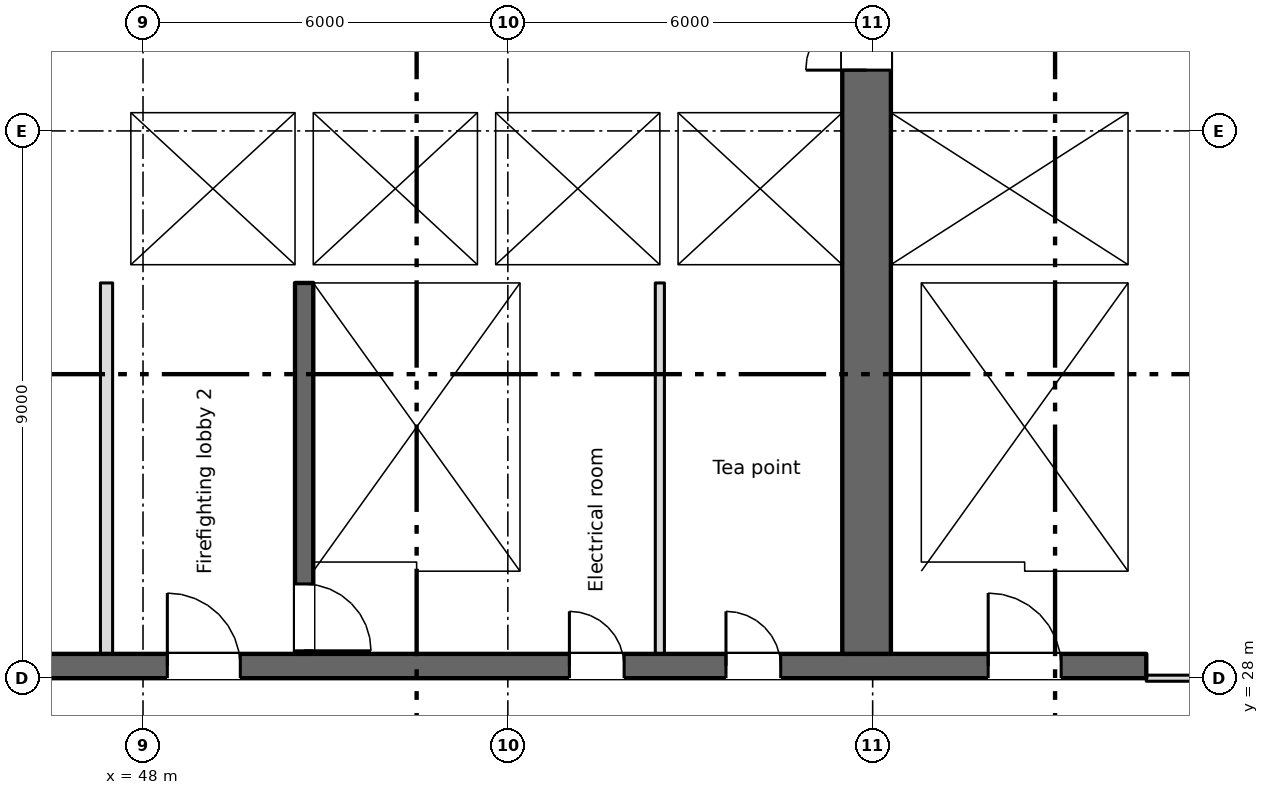
"""IFC4 building model, lengths in metres.
Left out: names, types, materials, properties, quantities, classifications, styles, units other than length and angle.
Written with IfcOpenShell. Run it as: python <this file> out.ifc"""

import sys

from ifc_helpers import new_model, si_unit, direction, frame, frame_2d, origin, place, context, subcontext, project, spatial, rectangle, extrude, element, fill, save


model = new_model("IFC4")
c1 = context("Model", 3, precision=1e-05, world=origin(), true_north=direction((0.0, 1.0)))
c2 = subcontext(c1, "Body", "Model", "MODEL_VIEW")
j1 = project(units=[si_unit("LENGTHUNIT", "METRE"), si_unit("PLANEANGLEUNIT", "RADIAN")], contexts=[c1])
p1 = place(None, origin())
s1 = spatial("IfcSite", under=j1, at=p1, CompositionType="ELEMENT")
p2 = place(p1, origin())
s2 = spatial("IfcBuilding", under=s1, at=p2, CompositionType="ELEMENT")
p3 = place(p2, frame((0.0, 0.0, 95.0)))
s3 = spatial("IfcBuildingStorey", under=s2, at=p3, CompositionType="ELEMENT", Elevation=95.0)
p4 = place(p3, frame((6.7, 28.2, 0.0), z_axis=(0.0, 0.0, 1.0), x_axis=(1.0, 0.0, 0.0)))
e1 = element("IfcWall", 1, at=p4, inside=s3, PredefinedType="SHEAR", context=c2, shape_type="SweptSolid", body=[
    extrude(rectangle(XDim=57.8, YDim=0.4, at=frame_2d((28.9, 0.0))), origin(), (0.0, 0.0, 1.0), 3.35),
])
p5 = place(p4, frame((12.812, 0.0, 0.0)))
e2 = element("IfcOpeningElement", 2, at=p5, cuts=e1, PredefinedType="OPENING", context=c2, shape_type="SweptSolid", body=[
    extrude(rectangle(XDim=0.9, YDim=2.1, at=frame_2d((0.45, 1.05))), frame((0.0, 0.21, 0.0), z_axis=(0.0, -1.0, 0.0), x_axis=(1.0, 0.0, 0.0)), (0.0, 0.0, 1.0), 0.42),
])
p6 = place(p4, frame((15.387, 0.0, 0.0)))
e3 = element("IfcOpeningElement", 3, at=p6, cuts=e1, PredefinedType="OPENING", context=c2, shape_type="SweptSolid", body=[
    extrude(rectangle(XDim=0.9, YDim=2.1, at=frame_2d((0.45, 1.05))), frame((0.0, 0.21, 0.0), z_axis=(0.0, -1.0, 0.0), x_axis=(1.0, 0.0, 0.0)), (0.0, 0.0, 1.0), 0.42),
])
p7 = place(p4, frame((48.312, 0.0, 0.0)))
e4 = element("IfcOpeningElement", 4, at=p7, cuts=e1, PredefinedType="OPENING", context=c2, shape_type="SweptSolid", body=[
    extrude(rectangle(XDim=0.9, YDim=2.1, at=frame_2d((0.45, 1.05))), frame((0.0, 0.21, 0.0), z_axis=(0.0, -1.0, 0.0), x_axis=(1.0, 0.0, 0.0)), (0.0, 0.0, 1.0), 0.42),
])
p8 = place(p4, frame((50.887, 0.0, 0.0)))
e5 = element("IfcOpeningElement", 5, at=p8, cuts=e1, PredefinedType="OPENING", context=c2, shape_type="SweptSolid", body=[
    extrude(rectangle(XDim=0.9, YDim=2.1, at=frame_2d((0.45, 1.05))), frame((0.0, 0.21, 0.0), z_axis=(0.0, -1.0, 0.0), x_axis=(1.0, 0.0, 0.0)), (0.0, 0.0, 1.0), 0.42),
])
p9 = place(p4, frame((0.562, 0.0, 0.0)))
e6 = element("IfcOpeningElement", 6, at=p9, cuts=e1, PredefinedType="OPENING", context=c2, shape_type="SweptSolid", body=[
    extrude(rectangle(XDim=0.9, YDim=2.1, at=frame_2d((0.45, 1.05))), frame((0.0, 0.21, 0.0), z_axis=(0.0, -1.0, 0.0), x_axis=(1.0, 0.0, 0.0)), (0.0, 0.0, 1.0), 0.42),
])
p10 = place(p4, frame((2.137, 0.0, 0.0)))
e7 = element("IfcOpeningElement", 7, at=p10, cuts=e1, PredefinedType="OPENING", context=c2, shape_type="SweptSolid", body=[
    extrude(rectangle(XDim=0.9, YDim=2.1, at=frame_2d((0.45, 1.05))), frame((0.0, 0.21, 0.0), z_axis=(0.0, -1.0, 0.0), x_axis=(1.0, 0.0, 0.0)), (0.0, 0.0, 1.0), 0.42),
])
p11 = place(p4, frame((4.7, 0.0, 0.0)))
e8 = element("IfcOpeningElement", 8, at=p11, cuts=e1, PredefinedType="OPENING", context=c2, shape_type="SweptSolid", body=[
    extrude(rectangle(XDim=1.2, YDim=2.1, at=frame_2d((0.6, 1.05))), frame((0.0, 0.21, 0.0), z_axis=(0.0, -1.0, 0.0), x_axis=(1.0, 0.0, 0.0)), (0.0, 0.0, 1.0), 0.42),
])
p12 = place(p4, frame((31.7, 0.0, 0.0)))
e9 = element("IfcOpeningElement", 9, at=p12, cuts=e1, PredefinedType="OPENING", context=c2, shape_type="SweptSolid", body=[
    extrude(rectangle(XDim=1.2, YDim=2.1, at=frame_2d((0.6, 1.05))), frame((0.0, 0.21, 0.0), z_axis=(0.0, -1.0, 0.0), x_axis=(1.0, 0.0, 0.0)), (0.0, 0.0, 1.0), 0.42),
])
p13 = place(p4, frame((55.2, 0.0, 0.0)))
e10 = element("IfcOpeningElement", 10, at=p13, cuts=e1, PredefinedType="OPENING", context=c2, shape_type="SweptSolid", body=[
    extrude(rectangle(XDim=1.2, YDim=2.1, at=frame_2d((0.6, 1.05))), frame((0.0, 0.21, 0.0), z_axis=(0.0, -1.0, 0.0), x_axis=(1.0, 0.0, 0.0)), (0.0, 0.0, 1.0), 0.42),
])
p14 = place(p4, frame((21.7, 0.0, 0.0)))
e11 = element("IfcOpeningElement", 11, at=p14, cuts=e1, PredefinedType="OPENING", context=c2, shape_type="SweptSolid", body=[
    extrude(rectangle(XDim=1.2, YDim=2.1, at=frame_2d((0.6, 1.05))), frame((0.0, 0.21, 0.0), z_axis=(0.0, -1.0, 0.0), x_axis=(1.0, 0.0, 0.0)), (0.0, 0.0, 1.0), 0.42),
])
p15 = place(p4, frame((41.7, 0.0, 0.0)))
e12 = element("IfcOpeningElement", 12, at=p15, cuts=e1, PredefinedType="OPENING", context=c2, shape_type="SweptSolid", body=[
    extrude(rectangle(XDim=1.2, YDim=2.1, at=frame_2d((0.6, 1.05))), frame((0.0, 0.21, 0.0), z_axis=(0.0, -1.0, 0.0), x_axis=(1.0, 0.0, 0.0)), (0.0, 0.0, 1.0), 0.42),
])
p16 = place(p4, frame((24.85, 0.0, 0.0)))
e13 = element("IfcOpeningElement", 13, at=p16, cuts=e1, PredefinedType="OPENING", context=c2, shape_type="SweptSolid", body=[
    extrude(rectangle(XDim=2.4, YDim=2.1, at=frame_2d((1.2, 1.05))), frame((0.0, 0.21, 0.0), z_axis=(0.0, -1.0, 0.0), x_axis=(1.0, 0.0, 0.0)), (0.0, 0.0, 1.0), 0.42),
])
p17 = place(p4, frame((37.35, 0.0, 0.0)))
e14 = element("IfcOpeningElement", 14, at=p17, cuts=e1, PredefinedType="OPENING", context=c2, shape_type="SweptSolid", body=[
    extrude(rectangle(XDim=2.4, YDim=2.1, at=frame_2d((1.2, 1.05))), frame((0.0, 0.21, 0.0), z_axis=(0.0, -1.0, 0.0), x_axis=(1.0, 0.0, 0.0)), (0.0, 0.0, 1.0), 0.42),
])
p18 = place(p4, frame((7.95, 0.0, 0.0)))
e15 = element("IfcOpeningElement", 15, at=p18, cuts=e1, PredefinedType="OPENING", context=c2, shape_type="SweptSolid", body=[
    extrude(rectangle(XDim=2.4, YDim=2.1, at=frame_2d((1.2, 1.05))), frame((0.0, 0.21, 0.0), z_axis=(0.0, -1.0, 0.0), x_axis=(1.0, 0.0, 0.0)), (0.0, 0.0, 1.0), 0.42),
])
p19 = place(p4, frame((28.85, 0.0, 0.0)))
e16 = element("IfcOpeningElement", 16, at=p19, cuts=e1, PredefinedType="OPENING", context=c2, shape_type="SweptSolid", body=[
    extrude(rectangle(XDim=0.9, YDim=2.1, at=frame_2d((0.45, 1.05))), frame((0.0, 0.21, 0.0), z_axis=(0.0, -1.0, 0.0), x_axis=(1.0, 0.0, 0.0)), (0.0, 0.0, 1.0), 0.42),
])
p20 = place(p4, frame((34.85, 0.0, 0.0)))
e17 = element("IfcOpeningElement", 17, at=p20, cuts=e1, PredefinedType="OPENING", context=c2, shape_type="SweptSolid", body=[
    extrude(rectangle(XDim=0.9, YDim=2.1, at=frame_2d((0.45, 1.05))), frame((0.0, 0.21, 0.0), z_axis=(0.0, -1.0, 0.0), x_axis=(1.0, 0.0, 0.0)), (0.0, 0.0, 1.0), 0.42),
])
p21 = place(p3, frame((64.35, 34.8, 0.0), z_axis=(0.0, 0.0, 1.0), x_axis=(0.0, 1.0, 0.0)))
e18 = element("IfcWall", 18, at=p21, inside=s3, PredefinedType="SHEAR", context=c2, shape_type="SweptSolid", body=[
    extrude(rectangle(XDim=10.4, YDim=0.3, at=frame_2d((5.2, 0.0))), origin(), (0.0, 0.0, 1.0), 3.35),
])
p22 = place(p3, frame((59.9, 28.4, 0.0), z_axis=(0.0, 0.0, 1.0), x_axis=(0.0, 1.0, 0.0)))
e19 = element("IfcWall", 19, at=p22, inside=s3, PredefinedType="SHEAR", context=c2, shape_type="SweptSolid", body=[
    extrude(rectangle(XDim=16.8, YDim=0.8, at=frame_2d((8.4, 0.0))), origin(), (0.0, 0.0, 1.0), 3.35),
])
p23 = place(p22, frame((9.6, 0.0, 0.0)))
e20 = element("IfcOpeningElement", 20, at=p23, cuts=e19, PredefinedType="OPENING", context=c2, shape_type="SweptSolid", body=[
    extrude(rectangle(XDim=2.0, YDim=2.1, at=frame_2d((1.0, 1.05))), frame((0.0, 0.41, 0.0), z_axis=(0.0, -1.0, 0.0), x_axis=(1.0, 0.0, 0.0)), (0.0, 0.0, 1.0), 0.82),
])
p24 = place(p22, frame((15.35, 0.0, 0.0)))
e21 = element("IfcOpeningElement", 21, at=p24, cuts=e19, PredefinedType="OPENING", context=c2, shape_type="SweptSolid", body=[
    extrude(rectangle(XDim=1.2, YDim=2.1, at=frame_2d((0.6, 1.05))), frame((0.0, 0.41, 0.0), z_axis=(0.0, -1.0, 0.0), x_axis=(1.0, 0.0, 0.0)), (0.0, 0.0, 1.0), 0.82),
])
p25 = place(p3, frame((50.65, 34.5, 0.0), z_axis=(0.0, 0.0, 1.0), x_axis=(0.0, -1.0, 0.0)))
e22 = element("IfcWall", 22, at=p25, inside=s3, PredefinedType="SHEAR", context=c2, shape_type="SweptSolid", body=[
    extrude(rectangle(XDim=6.1, YDim=0.3, at=frame_2d((3.05, 0.0))), origin(), (0.0, 0.0, 1.0), 3.35),
])
p26 = place(p25, frame((4.95, 0.0, 0.0)))
e23 = element("IfcOpeningElement", 23, at=p26, cuts=e22, PredefinedType="OPENING", context=c2, shape_type="SweptSolid", body=[
    extrude(rectangle(XDim=1.1, YDim=2.1, at=frame_2d((0.55, 1.05))), frame((0.0, 0.16, 0.0), z_axis=(0.0, -1.0, 0.0), x_axis=(1.0, 0.0, 0.0)), (0.0, 0.0, 1.0), 0.32),
])
p27 = place(p3, frame((54.35, 28.4, 0.0), z_axis=(0.0, 0.0, 1.0), x_axis=(0.0, 1.0, 0.0)))
e24 = element("IfcWall", 24, at=p27, inside=s3, PredefinedType="SHEAR", context=c2, shape_type="SweptSolid", body=[
    extrude(rectangle(XDim=6.1, YDim=0.3, at=frame_2d((3.05, 0.0))), origin(), (0.0, 0.0, 1.0), 3.35),
])
p28 = place(p3, frame((60.55, 28.4, 0.0), z_axis=(0.0, 0.0, 1.0), x_axis=(0.0, 1.0, 0.0)))
e25 = element("IfcWall", 25, at=p28, inside=s3, PredefinedType="SHEAR", context=c2, shape_type="SweptSolid", body=[
    extrude(rectangle(XDim=6.1, YDim=0.5, at=frame_2d((3.05, 0.0))), origin(), (0.0, 0.0, 1.0), 3.35),
])
p29 = place(p3, frame((64.35, 28.4, 0.0), z_axis=(0.0, 0.0, 1.0), x_axis=(0.0, 1.0, 0.0)))
e26 = element("IfcWall", 26, at=p29, inside=s3, PredefinedType="SHEAR", context=c2, shape_type="SweptSolid", body=[
    extrude(rectangle(XDim=6.1, YDim=0.3, at=frame_2d((3.05, 0.0))), origin(), (0.0, 0.0, 1.0), 3.35),
])
p30 = place(p3, frame((47.3, 34.65, 0.0), z_axis=(0.0, 0.0, 1.0), x_axis=(1.0, 0.0, 0.0)))
e27 = element("IfcWall", 27, at=p30, inside=s3, PredefinedType="SHEAR", context=c2, shape_type="SweptSolid", body=[
    extrude(rectangle(XDim=12.2, YDim=0.3, at=frame_2d((6.1, 0.0))), origin(), (0.0, 0.0, 1.0), 3.35),
])
p31 = place(p30, frame((1.3, 0.0, 0.0)))
e28 = element("IfcOpeningElement", 28, at=p31, cuts=e27, PredefinedType="OPENING", context=c2, shape_type="SweptSolid", body=[
    extrude(rectangle(XDim=1.1, YDim=2.1, at=frame_2d((0.55, 1.05))), frame((0.0, 0.16, 0.0), z_axis=(0.0, -1.0, 0.0), x_axis=(1.0, 0.0, 0.0)), (0.0, 0.0, 1.0), 0.32),
])
p32 = place(p3, frame((60.3, 34.65, 0.0), z_axis=(0.0, 0.0, 1.0), x_axis=(1.0, 0.0, 0.0)))
e29 = element("IfcWall", 29, at=p32, inside=s3, PredefinedType="SHEAR", context=c2, shape_type="SweptSolid", body=[
    extrude(rectangle(XDim=4.2, YDim=0.3, at=frame_2d((2.1, 0.0))), origin(), (0.0, 0.0, 1.0), 3.35),
])
p33 = place(p3, frame((47.3, 37.45, 0.0), z_axis=(0.0, 0.0, 1.0), x_axis=(1.0, 0.0, 0.0)))
e30 = element("IfcWall", 30, at=p33, inside=s3, PredefinedType="SHEAR", context=c2, shape_type="SweptSolid", body=[
    extrude(rectangle(XDim=12.2, YDim=0.3, at=frame_2d((6.1, 0.0))), origin(), (0.0, 0.0, 1.0), 3.35),
])
p34 = place(p33, frame((4.3, 0.0, 0.0)))
e31 = element("IfcOpeningElement", 31, at=p34, cuts=e30, PredefinedType="OPENING", context=c2, shape_type="SweptSolid", body=[
    extrude(rectangle(XDim=1.1, YDim=2.1, at=frame_2d((0.55, 1.05))), frame((0.0, 0.16, 0.0), z_axis=(0.0, -1.0, 0.0), x_axis=(1.0, 0.0, 0.0)), (0.0, 0.0, 1.0), 0.32),
])
p35 = place(p33, frame((7.3, 0.0, 0.0)))
e32 = element("IfcOpeningElement", 32, at=p35, cuts=e30, PredefinedType="OPENING", context=c2, shape_type="SweptSolid", body=[
    extrude(rectangle(XDim=1.1, YDim=2.1, at=frame_2d((0.55, 1.05))), frame((0.0, 0.16, 0.0), z_axis=(0.0, -1.0, 0.0), x_axis=(1.0, 0.0, 0.0)), (0.0, 0.0, 1.0), 0.32),
])
p36 = place(p33, frame((10.3, 0.0, 0.0)))
e33 = element("IfcOpeningElement", 33, at=p36, cuts=e30, PredefinedType="OPENING", context=c2, shape_type="SweptSolid", body=[
    extrude(rectangle(XDim=1.1, YDim=2.1, at=frame_2d((0.55, 1.05))), frame((0.0, 0.16, 0.0), z_axis=(0.0, -1.0, 0.0), x_axis=(1.0, 0.0, 0.0)), (0.0, 0.0, 1.0), 0.32),
])
p37 = place(p3, frame((60.3, 37.45, 0.0), z_axis=(0.0, 0.0, 1.0), x_axis=(1.0, 0.0, 0.0)))
e34 = element("IfcWall", 34, at=p37, inside=s3, PredefinedType="SHEAR", context=c2, shape_type="SweptSolid", body=[
    extrude(rectangle(XDim=3.9, YDim=0.3, at=frame_2d((1.95, 0.0))), origin(), (0.0, 0.0, 1.0), 3.35),
])
p38 = place(p37, frame((1.4, 0.0, 0.0)))
e35 = element("IfcOpeningElement", 35, at=p38, cuts=e34, PredefinedType="OPENING", context=c2, shape_type="SweptSolid", body=[
    extrude(rectangle(XDim=1.1, YDim=2.1, at=frame_2d((0.55, 1.05))), frame((0.0, 0.16, 0.0), z_axis=(0.0, -1.0, 0.0), x_axis=(1.0, 0.0, 0.0)), (0.0, 0.0, 1.0), 0.32),
])
p39 = place(p3, frame((47.55, 34.8, 0.0), z_axis=(0.0, 0.0, 1.0), x_axis=(0.0, 1.0, 0.0)))
e36 = element("IfcWall", 36, at=p39, inside=s3, PredefinedType="SHEAR", context=c2, shape_type="SweptSolid", body=[
    extrude(rectangle(XDim=2.5, YDim=0.5, at=frame_2d((1.25, 0.0))), origin(), (0.0, 0.0, 1.0), 3.35),
])
for number, where, z_axis, x_axis in (
    (37, (50.65, 34.8, 0.0), (0.0, 0.0, 1.0), (0.0, 1.0, 0.0)),
    (38, (53.65, 34.8, 0.0), (0.0, 0.0, 1.0), (0.0, 1.0, 0.0)),
    (39, (56.65, 34.8, 0.0), (0.0, 0.0, 1.0), (0.0, 1.0, 0.0)),
):
    element("IfcWall", number, at=place(p3, frame(where, z_axis=z_axis, x_axis=x_axis)), inside=s3, PredefinedType="SHEAR", context=c2, shape_type="SweptSolid", body=[
        extrude(rectangle(XDim=2.5, YDim=0.3, at=frame_2d((1.25, 0.0))), origin(), (0.0, 0.0, 1.0), 3.35),
    ])
p40 = place(p3, frame((47.4, 28.4, 0.0), z_axis=(0.0, 0.0, 1.0), x_axis=(0.0, 1.0, 0.0)))
e40 = element("IfcWall", 40, at=p40, inside=s3, PredefinedType="PARTITIONING", context=c2, shape_type="SweptSolid", body=[
    extrude(rectangle(XDim=6.1, YDim=0.2, at=frame_2d((3.05, 0.0))), origin(), (0.0, 0.0, 1.0), 3.35),
])
p41 = place(p3, frame((56.5, 28.4, 0.0), z_axis=(0.0, 0.0, 1.0), x_axis=(0.0, 1.0, 0.0)))
e41 = element("IfcWall", 41, at=p41, inside=s3, PredefinedType="PARTITIONING", context=c2, shape_type="SweptSolid", body=[
    extrude(rectangle(XDim=6.1, YDim=0.15, at=frame_2d((3.05, 0.0))), origin(), (0.0, 0.0, 1.0), 3.35),
])
p42 = place(p3, frame((64.5, 28.0, 0.0), z_axis=(0.0, 0.0, 1.0), x_axis=(1.0, 0.0, 0.0)))
e42 = element("IfcWall", 42, at=p42, inside=s3, PredefinedType="PARTITIONING", context=c2, shape_type="SweptSolid", body=[
    extrude(rectangle(XDim=6.8, YDim=0.1, at=frame_2d((3.4, 0.0))), origin(), (0.0, 0.0, 1.0), 3.35),
])
p43 = place(p42, frame((2.5, 0.0, 0.0)))
e43 = element("IfcOpeningElement", 43, at=p43, cuts=e42, PredefinedType="OPENING", context=c2, shape_type="SweptSolid", body=[
    extrude(rectangle(XDim=1.8, YDim=2.1, at=frame_2d((0.9, 1.05))), frame((0.0, 0.06, 0.0), z_axis=(0.0, -1.0, 0.0), x_axis=(1.0, 0.0, 0.0)), (0.0, 0.0, 1.0), 0.12),
])
p44 = place(p7, origin())
e44 = element("IfcDoor", 44, at=p44, inside=s3, OperationType="SINGLE_SWING_LEFT", PredefinedType="DOOR", context=c2, shape_type="SweptSolid", body=[
    extrude(rectangle(XDim=0.9, YDim=2.1, at=frame_2d((0.45, 1.05))), frame((0.0, 0.025, 0.0), z_axis=(0.0, -1.0, 0.0), x_axis=(1.0, 0.0, 0.0)), (0.0, 0.0, 1.0), 0.05),
])
fill(e4, e44)
p45 = place(p8, origin())
e45 = element("IfcDoor", 45, at=p45, inside=s3, OperationType="SINGLE_SWING_LEFT", PredefinedType="DOOR", context=c2, shape_type="SweptSolid", body=[
    extrude(rectangle(XDim=0.9, YDim=2.1, at=frame_2d((0.45, 1.05))), frame((0.0, 0.025, 0.0), z_axis=(0.0, -1.0, 0.0), x_axis=(1.0, 0.0, 0.0)), (0.0, 0.0, 1.0), 0.05),
])
fill(e5, e45)
p46 = place(p34, origin())
e46 = element("IfcDoor", 46, at=p46, inside=s3, OperationType="SLIDING_TO_LEFT", PredefinedType="DOOR", context=c2, shape_type="SweptSolid", body=[
    extrude(rectangle(XDim=1.1, YDim=2.1, at=frame_2d((0.55, 1.05))), frame((0.0, 0.025, 0.0), z_axis=(0.0, -1.0, 0.0), x_axis=(1.0, 0.0, 0.0)), (0.0, 0.0, 1.0), 0.05),
])
fill(e31, e46)
p47 = place(p35, origin())
e47 = element("IfcDoor", 47, at=p47, inside=s3, OperationType="SLIDING_TO_LEFT", PredefinedType="DOOR", context=c2, shape_type="SweptSolid", body=[
    extrude(rectangle(XDim=1.1, YDim=2.1, at=frame_2d((0.55, 1.05))), frame((0.0, 0.025, 0.0), z_axis=(0.0, -1.0, 0.0), x_axis=(1.0, 0.0, 0.0)), (0.0, 0.0, 1.0), 0.05),
])
fill(e32, e47)
p48 = place(p36, origin())
e48 = element("IfcDoor", 48, at=p48, inside=s3, OperationType="SLIDING_TO_LEFT", PredefinedType="DOOR", context=c2, shape_type="SweptSolid", body=[
    extrude(rectangle(XDim=1.1, YDim=2.1, at=frame_2d((0.55, 1.05))), frame((0.0, 0.025, 0.0), z_axis=(0.0, -1.0, 0.0), x_axis=(1.0, 0.0, 0.0)), (0.0, 0.0, 1.0), 0.05),
])
fill(e33, e48)
p49 = place(p38, origin())
e49 = element("IfcDoor", 49, at=p49, inside=s3, OperationType="SLIDING_TO_LEFT", PredefinedType="DOOR", context=c2, shape_type="SweptSolid", body=[
    extrude(rectangle(XDim=1.1, YDim=2.1, at=frame_2d((0.55, 1.05))), frame((0.0, 0.025, 0.0), z_axis=(0.0, -1.0, 0.0), x_axis=(1.0, 0.0, 0.0)), (0.0, 0.0, 1.0), 0.05),
])
fill(e35, e49)
p50 = place(p31, origin())
e50 = element("IfcDoor", 50, at=p50, inside=s3, OperationType="SLIDING_TO_LEFT", PredefinedType="DOOR", context=c2, shape_type="SweptSolid", body=[
    extrude(rectangle(XDim=1.1, YDim=2.1, at=frame_2d((0.55, 1.05))), frame((0.0, 0.025, 0.0), z_axis=(0.0, -1.0, 0.0), x_axis=(1.0, 0.0, 0.0)), (0.0, 0.0, 1.0), 0.05),
])
fill(e28, e50)
p51 = place(p26, origin())
e51 = element("IfcDoor", 51, at=p51, inside=s3, OperationType="SINGLE_SWING_RIGHT", PredefinedType="DOOR", context=c2, shape_type="SweptSolid", body=[
    extrude(rectangle(XDim=1.1, YDim=2.1, at=frame_2d((0.55, 1.05))), frame((0.0, 0.025, 0.0), z_axis=(0.0, -1.0, 0.0), x_axis=(1.0, 0.0, 0.0)), (0.0, 0.0, 1.0), 0.05),
])
fill(e23, e51)
p52 = place(p13, origin())
e52 = element("IfcDoor", 52, at=p52, inside=s3, OperationType="SINGLE_SWING_LEFT", PredefinedType="DOOR", context=c2, shape_type="SweptSolid", body=[
    extrude(rectangle(XDim=1.2, YDim=2.1, at=frame_2d((0.6, 1.05))), frame((0.0, 0.025, 0.0), z_axis=(0.0, -1.0, 0.0), x_axis=(1.0, 0.0, 0.0)), (0.0, 0.0, 1.0), 0.05),
])
fill(e10, e52)
p53 = place(p15, origin())
e53 = element("IfcDoor", 53, at=p53, inside=s3, OperationType="SINGLE_SWING_LEFT", PredefinedType="DOOR", context=c2, shape_type="SweptSolid", body=[
    extrude(rectangle(XDim=1.2, YDim=2.1, at=frame_2d((0.6, 1.05))), frame((0.0, 0.025, 0.0), z_axis=(0.0, -1.0, 0.0), x_axis=(1.0, 0.0, 0.0)), (0.0, 0.0, 1.0), 0.05),
])
fill(e12, e53)
p54 = place(p23, origin())
e54 = element("IfcDoor", 54, at=p54, inside=s3, OperationType="DOUBLE_DOOR_SINGLE_SWING", PredefinedType="DOOR", context=c2, shape_type="SweptSolid", body=[
    extrude(rectangle(XDim=2.0, YDim=2.1, at=frame_2d((1.0, 1.05))), frame((0.0, 0.025, 0.0), z_axis=(0.0, -1.0, 0.0), x_axis=(1.0, 0.0, 0.0)), (0.0, 0.0, 1.0), 0.05),
])
fill(e20, e54)
save(model, sys.argv[1])
